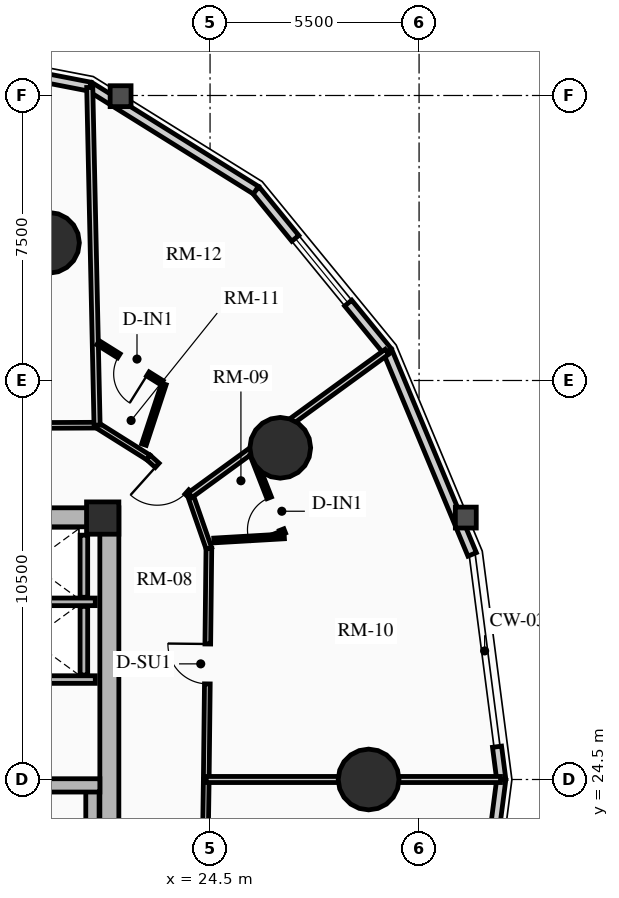
"""IFC4 building model, lengths in metres.
Left out: names, types, materials, properties, quantities, classifications, styles, units other than length and angle.
Written with IfcOpenShell. Run it as: python <this file> out.ifc"""

import sys

from ifc_helpers import new_model, si_unit, direction, frame, frame_2d, origin, origin_2d, place, context, subcontext, project, spatial, rectangle, circle, extrude, source, transform, mapped, element, fill, save


model = new_model("IFC4")
c1 = context("Model", 3, precision=1e-05, world=origin(), true_north=direction((0.0, 1.0)))
c2 = subcontext(c1, "Body", "Model", "MODEL_VIEW")
j1 = project(units=[si_unit("LENGTHUNIT", "METRE"), si_unit("PLANEANGLEUNIT", "RADIAN")], contexts=[c1])
p1 = place(None, origin())
s1 = spatial("IfcSite", under=j1, at=p1, CompositionType="ELEMENT")
p2 = place(p1, origin())
s2 = spatial("IfcBuilding", under=s1, at=p2, CompositionType="ELEMENT")
p3 = place(p2, frame((0.0, 0.0, 54.01)))
s3 = spatial("IfcBuildingStorey", under=s2, at=p3, CompositionType="ELEMENT", Elevation=54.01)
p4 = place(p3, frame((21.85, 17.35, 0.0), z_axis=(0.0, 0.0, 1.0), x_axis=(0.0, 1.0, 0.0)))
e1 = element("IfcWall", 1, at=p4, inside=s3, PredefinedType="SHEAR", context=c2, shape_type="SweptSolid", body=[
    extrude(rectangle(XDim=14.3, YDim=0.5, at=frame_2d((7.15, 0.0))), origin(), (0.0, 0.0, 1.0), 2.91),
])
p5 = place(p3, frame((11.15, 31.4, 0.0), z_axis=(0.0, 0.0, 1.0), x_axis=(1.0, 0.0, 0.0)))
e2 = element("IfcWall", 2, at=p5, inside=s3, PredefinedType="SHEAR", context=c2, shape_type="SweptSolid", body=[
    extrude(rectangle(XDim=10.7, YDim=0.5, at=frame_2d((5.35, 0.0))), origin(), (0.0, 0.0, 1.0), 2.91),
])
m1 = source(origin(), c2, "Body", "SweptSolid", [
    extrude(rectangle(XDim=1.5, YDim=2.02, at=frame_2d((0.75, 1.01))), frame((0.0, 0.26, 0.0), z_axis=(0.0, -1.0, 0.0), x_axis=(1.0, 0.0, 0.0)), (0.0, 0.0, 1.0), 0.52),
])
p6 = place(p5, frame((4.6, 0.0, 0.0)))
e3 = element("IfcOpeningElement", 3, at=p6, cuts=e2, PredefinedType="OPENING", context=c2, shape_type="MappedRepresentation", body=[
    mapped(m1, transform((0.0, 0.0, 0.0), x_axis=(1.0, 0.0, 0.0), y_axis=(0.0, 1.0, 0.0), z_axis=(0.0, 0.0, 1.0), scale=1.0)),
])
p7 = place(p3, frame((21.405, 17.6, 0.0), z_axis=(0.0, 0.0, 1.0), x_axis=(0.0, 1.0, 0.0)))
e4 = element("IfcWall", 4, at=p7, inside=s3, PredefinedType="SHEAR", context=c2, shape_type="SweptSolid", body=[
    extrude(rectangle(XDim=6.745, YDim=0.35, at=frame_2d((3.373, 0.0))), origin(), (0.0, 0.0, 1.0), 2.91),
])
p8 = place(p3, frame((18.315, 24.345, 0.0), z_axis=(0.0, 0.0, 1.0), x_axis=(1.0, 0.0, 0.0)))
e5 = element("IfcWall", 5, at=p8, inside=s3, PredefinedType="SHEAR", context=c2, shape_type="SweptSolid", body=[
    extrude(rectangle(XDim=3.285, YDim=0.35, at=frame_2d((1.643, 0.0))), origin(), (0.0, 0.0, 1.0), 2.91),
])
p9 = place(p3, frame((21.675, 31.38, 0.0), z_axis=(0.0, 0.0, 1.0), x_axis=(1.0, 0.0, 0.0)))
e6 = element("IfcColumn", 6, at=p9, inside=s3, PredefinedType="COLUMN", context=c2, shape_type="SweptSolid", body=[
    extrude(rectangle(XDim=0.85, YDim=0.85, at=origin_2d()), origin(), (0.0, 0.0, 1.0), 2.91),
])
for number, where, z_axis, x_axis in (
    (7, (28.672, 24.5, 0.0), (0.0, 0.0, 1.0), (1.0, 0.0, 0.0)),
    (8, (26.347, 33.229, 0.0), (0.0, 0.0, 1.0), (1.0, 0.0, 0.0)),
    (9, (20.261, 38.623, 0.0), (0.0, 0.0, 1.0), (1.0, 0.0, 0.0)),
):
    element("IfcColumn", number, at=place(p3, frame(where, z_axis=z_axis, x_axis=x_axis)), inside=s3, PredefinedType="USERDEFINED", context=c2, shape_type="SweptSolid", body=[
        extrude(circle(Radius=0.8, at=origin_2d()), origin(), (0.0, 0.0, 1.0), 2.91),
    ])
p10 = place(p3, frame((32.051, 25.363, 0.0), z_axis=(0.0, 0.0, 1.0), x_axis=(0.128523364007, -0.991706481225, 0.0)))
e10 = element("IfcWall", 10, at=p10, inside=s3, PredefinedType="SOLIDWALL", context=c2, shape_type="SweptSolid", body=[
    extrude(rectangle(XDim=0.87, YDim=0.24, at=frame_2d((0.435, 0.0))), origin(), (0.0, 0.0, 1.0), 2.635),
])
p11 = place(p3, frame((29.172, 35.768, 0.0), z_axis=(0.0, 0.0, 1.0), x_axis=(0.384348836956, -0.923187939442, 0.0)))
e11 = element("IfcWall", 11, at=p11, inside=s3, PredefinedType="SOLIDWALL", context=c2, shape_type="SweptSolid", body=[
    extrude(rectangle(XDim=5.789, YDim=0.24, at=frame_2d((2.894, 0.0))), origin(), (0.0, 0.0, 1.0), 2.073),
])
p12 = place(p3, frame((25.707, 40.009, 0.0), z_axis=(0.0, 0.0, 1.0), x_axis=(0.632713287022, -0.77438614168, 0.0)))
e12 = element("IfcWall", 12, at=p12, inside=s3, PredefinedType="SOLIDWALL", context=c2, shape_type="SweptSolid", body=[
    extrude(rectangle(XDim=5.477, YDim=0.24, at=frame_2d((2.738, 0.0))), origin(), (0.0, 0.0, 1.0), 2.073),
])
m2 = source(origin(), c2, "Body", "SweptSolid", [
    extrude(rectangle(XDim=2.2, YDim=1.35, at=frame_2d((1.1, 0.675))), frame((0.0, 0.13, 0.0), z_axis=(0.0, -1.0, 0.0), x_axis=(1.0, 0.0, 0.0)), (0.0, 0.0, 1.0), 0.26),
])
p13 = place(p12, frame((1.638, 0.0, 0.65)))
e13 = element("IfcOpeningElement", 13, at=p13, cuts=e12, PredefinedType="OPENING", context=c2, shape_type="MappedRepresentation", body=[
    mapped(m2, transform((0.0, 0.0, 0.0), x_axis=(1.0, 0.0, 0.0), y_axis=(0.0, 1.0, 0.0), z_axis=(0.0, 0.0, 1.0), scale=1.0)),
])
p14 = place(p3, frame((21.34, 42.732, 0.0), z_axis=(0.0, 0.0, 1.0), x_axis=(0.848533613342, -0.529141481107, 0.0)))
e14 = element("IfcWall", 14, at=p14, inside=s3, PredefinedType="SOLIDWALL", context=c2, shape_type="SweptSolid", body=[
    extrude(rectangle(XDim=5.146, YDim=0.24, at=frame_2d((2.573, 0.0))), origin(), (0.0, 0.0, 1.0), 2.073),
])
p15 = place(p3, frame((16.5, 43.67, 0.0), z_axis=(0.0, 0.0, 1.0), x_axis=(0.981725274071, -0.190303668512, 0.0)))
e15 = element("IfcWall", 15, at=p15, inside=s3, PredefinedType="SOLIDWALL", context=c2, shape_type="SweptSolid", body=[
    extrude(rectangle(XDim=4.93, YDim=0.24, at=frame_2d((2.465, 0.0))), origin(), (0.0, 0.0, 1.0), 2.073),
])
m3 = source(origin(), c2, "Body", "SweptSolid", [
    extrude(rectangle(XDim=1.9, YDim=1.35, at=frame_2d((0.95, 0.675))), frame((0.0, 0.13, 0.0), z_axis=(0.0, -1.0, 0.0), x_axis=(1.0, 0.0, 0.0)), (0.0, 0.0, 1.0), 0.26),
])
p16 = place(p15, frame((1.515, 0.0, 0.65)))
e16 = element("IfcOpeningElement", 16, at=p16, cuts=e15, PredefinedType="OPENING", context=c2, shape_type="MappedRepresentation", body=[
    mapped(m3, transform((0.0, 0.0, 0.0), x_axis=(1.0, 0.0, 0.0), y_axis=(0.0, 1.0, 0.0), z_axis=(0.0, 0.0, 1.0), scale=1.0)),
])
p17 = place(p3, frame((32.163, 24.5, 0.0), z_axis=(0.0, 0.0, 1.0), x_axis=(-0.128339641463, -0.991730274031, 0.0)))
e17 = element("IfcWall", 17, at=p17, inside=s3, PredefinedType="SOLIDWALL", context=c2, shape_type="SweptSolid", body=[
    extrude(rectangle(XDim=5.973, YDim=0.24, at=frame_2d((2.987, 0.0))), origin(), (0.0, 0.0, 1.0), 2.073),
])
p18 = place(p17, frame((2.037, 0.0, 0.65)))
e18 = element("IfcOpeningElement", 18, at=p18, cuts=e17, PredefinedType="OPENING", context=c2, shape_type="MappedRepresentation", body=[
    mapped(m3, transform((0.0, 0.0, 0.0), x_axis=(1.0, 0.0, 0.0), y_axis=(0.0, 1.0, 0.0), z_axis=(0.0, 0.0, 1.0), scale=1.0)),
])
for number, where, z_axis, x_axis in (
    (19, (18.51, 27.13, 0.0), (0.0, 0.0, 1.0), (1.0, 0.0, 0.0)),
    (20, (18.51, 29.175, 0.0), (0.0, 0.0, 1.0), (1.0, 0.0, 0.0)),
):
    element("IfcWall", number, at=place(p3, frame(where, z_axis=z_axis, x_axis=x_axis)), inside=s3, PredefinedType="SHEAR", context=c2, shape_type="SweptSolid", body=[
        extrude(rectangle(XDim=2.97, YDim=0.2, at=frame_2d((1.485, 0.0))), origin(), (0.0, 0.0, 1.0), 2.91),
    ])
p19 = place(p3, frame((21.18, 27.25, 0.0), z_axis=(0.0, 0.0, 1.0), x_axis=(0.0, 1.0, 0.0)))
e21 = element("IfcWall", 21, at=p19, inside=s3, PredefinedType="SHEAR", context=c2, shape_type="SweptSolid", body=[
    extrude(rectangle(XDim=1.805, YDim=0.2, at=frame_2d((0.902, 0.0))), origin(), (0.0, 0.0, 1.0), 2.91),
])
p20 = place(p3, frame((21.18, 29.295, 0.0), z_axis=(0.0, 0.0, 1.0), x_axis=(0.0, 1.0, 0.0)))
e22 = element("IfcWall", 22, at=p20, inside=s3, PredefinedType="SHEAR", context=c2, shape_type="SweptSolid", body=[
    extrude(rectangle(XDim=1.635, YDim=0.2, at=frame_2d((0.817, 0.0))), origin(), (0.0, 0.0, 1.0), 2.91),
])
p21 = place(p3, frame((24.4, 24.5, 0.0), z_axis=(0.0, 0.0, 1.0), x_axis=(0.011359710161, 0.999935476411, 0.0)))
e23 = element("IfcWall", 23, at=p21, inside=s3, PredefinedType="PARTITIONING", context=c2, shape_type="SweptSolid", body=[
    extrude(rectangle(XDim=6.082, YDim=0.15, at=frame_2d((3.041, 0.0))), origin(), (0.0, 0.0, 1.0), 2.159),
])
m4 = source(origin(), c2, "Body", "SweptSolid", [
    extrude(rectangle(XDim=1.05, YDim=2.015, at=frame_2d((0.525, 1.007))), frame((0.0, 0.085, 0.0), z_axis=(0.0, -1.0, 0.0), x_axis=(1.0, 0.0, 0.0)), (0.0, 0.0, 1.0), 0.17),
])
p22 = place(p21, frame((2.516, 0.0, 0.0)))
e24 = element("IfcOpeningElement", 24, at=p22, cuts=e23, PredefinedType="OPENING", context=c2, shape_type="MappedRepresentation", body=[
    mapped(m4, transform((0.0, 0.0, 0.0), x_axis=(1.0, 0.0, 0.0), y_axis=(0.0, 1.0, 0.0), z_axis=(0.0, 0.0, 1.0), scale=1.0)),
])
p23 = place(p3, frame((24.469, 30.582, 0.0), z_axis=(0.0, 0.0, 1.0), x_axis=(-0.328902536986, 0.944363871166, 0.0)))
e25 = element("IfcWall", 25, at=p23, inside=s3, PredefinedType="PARTITIONING", context=c2, shape_type="SweptSolid", body=[
    extrude(rectangle(XDim=1.488, YDim=0.15, at=frame_2d((0.744, 0.0))), origin(), (0.0, 0.0, 1.0), 2.205),
])
p24 = place(p3, frame((23.98, 31.987, 0.0), z_axis=(0.0, 0.0, 1.0), x_axis=(-0.744317922268, 0.667825449193, 0.0)))
e26 = element("IfcWall", 26, at=p24, inside=s3, PredefinedType="PARTITIONING", context=c2, shape_type="SweptSolid", body=[
    extrude(rectangle(XDim=1.481, YDim=0.15, at=frame_2d((0.74, 0.0))), origin(), (0.0, 0.0, 1.0), 2.159),
])
p25 = place(p24, frame((0.12, 0.0, 0.0)))
e27 = element("IfcOpeningElement", 27, at=p25, cuts=e26, PredefinedType="OPENING", context=c2, shape_type="MappedRepresentation", body=[
    mapped(m4, transform((0.0, 0.0, 0.0), x_axis=(1.0, 0.0, 0.0), y_axis=(0.0, 1.0, 0.0), z_axis=(0.0, 0.0, 1.0), scale=1.0)),
])
p26 = place(p3, frame((22.877, 32.976, 0.0), z_axis=(0.0, 0.0, 1.0), x_axis=(-0.846723232687, 0.532033614754, 0.0)))
e28 = element("IfcWall", 28, at=p26, inside=s3, PredefinedType="PARTITIONING", context=c2, shape_type="SweptSolid", body=[
    extrude(rectangle(XDim=1.595, YDim=0.15, at=frame_2d((0.797, 0.0))), origin(), (0.0, 0.0, 1.0), 2.205),
])
p27 = place(p3, frame((21.527, 33.824, 0.0), z_axis=(0.0, 0.0, 1.0), x_axis=(-0.999990631344, -0.00432865146, 0.0)))
e29 = element("IfcWall", 29, at=p27, inside=s3, PredefinedType="PARTITIONING", context=c2, shape_type="SweptSolid", body=[
    extrude(rectangle(XDim=3.384, YDim=0.15, at=frame_2d((1.692, 0.0))), origin(), (0.0, 0.0, 1.0), 2.159),
])
p28 = place(p27, frame((1.69, 0.0, 0.0)))
e30 = element("IfcOpeningElement", 30, at=p28, cuts=e29, PredefinedType="OPENING", context=c2, shape_type="MappedRepresentation", body=[
    mapped(m4, transform((0.0, 0.0, 0.0), x_axis=(1.0, 0.0, 0.0), y_axis=(0.0, 1.0, 0.0), z_axis=(0.0, 0.0, 1.0), scale=1.0)),
])
p29 = place(p3, frame((24.313, 18.529, 0.0), z_axis=(0.0, 0.0, 1.0), x_axis=(0.014472275982, 0.99989527113, 0.0)))
e31 = element("IfcWall", 31, at=p29, inside=s3, PredefinedType="PARTITIONING", context=c2, shape_type="SweptSolid", body=[
    extrude(rectangle(XDim=5.972, YDim=0.15, at=frame_2d((2.986, 0.0))), origin(), (0.0, 0.0, 1.0), 2.635),
])
m5 = source(origin(), c2, "Body", "SweptSolid", [
    extrude(rectangle(XDim=1.0, YDim=2.015, at=frame_2d((0.5, 1.007))), frame((0.0, 0.085, 0.0), z_axis=(0.0, -1.0, 0.0), x_axis=(1.0, 0.0, 0.0)), (0.0, 0.0, 1.0), 0.17),
])
p30 = place(p29, frame((2.486, 0.0, 0.0)))
e32 = element("IfcOpeningElement", 32, at=p30, cuts=e31, PredefinedType="OPENING", context=c2, shape_type="MappedRepresentation", body=[
    mapped(m5, transform((0.0, 0.0, 0.0), x_axis=(1.0, 0.0, 0.0), y_axis=(0.0, 1.0, 0.0), z_axis=(0.0, 0.0, 1.0), scale=1.0)),
])
p31 = place(p3, frame((24.4, 24.5, 0.0), z_axis=(0.0, 0.0, 1.0), x_axis=(1.0, 0.0, 0.0)))
e33 = element("IfcWall", 33, at=p31, inside=s3, PredefinedType="PARTITIONING", context=c2, shape_type="SweptSolid", body=[
    extrude(rectangle(XDim=7.743, YDim=0.16, at=frame_2d((3.872, 0.0))), origin(), (0.0, 0.0, 1.0), 2.073),
])
p32 = place(p3, frame((23.98, 31.987, 0.0), z_axis=(0.0, 0.0, 1.0), x_axis=(0.80834018144, 0.588715679313, 0.0)))
e34 = element("IfcWall", 34, at=p32, inside=s3, PredefinedType="PARTITIONING", context=c2, shape_type="SweptSolid", body=[
    extrude(rectangle(XDim=6.403, YDim=0.16, at=frame_2d((3.202, 0.0))), origin(), (0.0, 0.0, 1.0), 2.073),
])
p33 = place(p3, frame((21.527, 33.824, 0.0), z_axis=(0.0, 0.0, 1.0), x_axis=(-0.021694017061, 0.999764657119, 0.0)))
e35 = element("IfcWall", 35, at=p33, inside=s3, PredefinedType="PARTITIONING", context=c2, shape_type="SweptSolid", body=[
    extrude(rectangle(XDim=8.891, YDim=0.16, at=frame_2d((4.445, 0.0))), origin(), (0.0, 0.0, 1.0), 2.073),
])
p34 = place(p3, frame((24.601, 30.79, 0.0), z_axis=(0.0, 0.0, 1.0), x_axis=(0.998323904123, 0.057873849514, 0.0)))
e36 = element("IfcWall", 36, at=p34, inside=s3, PredefinedType="PARTITIONING", context=c2, shape_type="SweptSolid", body=[
    extrude(rectangle(XDim=1.856, YDim=0.125, at=frame_2d((0.928, 0.0))), origin(), (0.0, 0.0, 1.0), 2.205),
])
p35 = place(p3, frame((26.428, 30.963, 0.0), z_axis=(0.0, 0.0, 1.0), x_axis=(-0.364149471566, 0.931340519014, 0.0)))
e37 = element("IfcWall", 37, at=p35, inside=s3, PredefinedType="PARTITIONING", context=c2, shape_type="SweptSolid", body=[
    extrude(rectangle(XDim=2.247, YDim=0.125, at=frame_2d((1.124, 0.0))), origin(), (0.0, 0.0, 1.0), 2.159),
])
m6 = source(origin(), c2, "Body", "SweptSolid", [
    extrude(rectangle(XDim=0.9, YDim=2.005, at=frame_2d((0.45, 1.002))), frame((0.0, 0.073, 0.0), z_axis=(0.0, -1.0, 0.0), x_axis=(1.0, 0.0, 0.0)), (0.0, 0.0, 1.0), 0.145),
])
p36 = place(p35, frame((0.12, 0.0, 0.0)))
e38 = element("IfcOpeningElement", 38, at=p36, cuts=e37, PredefinedType="OPENING", context=c2, shape_type="MappedRepresentation", body=[
    mapped(m6, transform((0.0, 0.0, 0.0), x_axis=(1.0, 0.0, 0.0), y_axis=(0.0, 1.0, 0.0), z_axis=(0.0, 0.0, 1.0), scale=1.0)),
])
p37 = place(p3, frame((22.76, 33.313, 0.0), z_axis=(0.0, 0.0, 1.0), x_axis=(0.312649886595, 0.949868437423, 0.0)))
e39 = element("IfcWall", 39, at=p37, inside=s3, PredefinedType="PARTITIONING", context=c2, shape_type="SweptSolid", body=[
    extrude(rectangle(XDim=1.68, YDim=0.125, at=frame_2d((0.84, 0.0))), origin(), (0.0, 0.0, 1.0), 2.205),
])
p38 = place(p3, frame((23.233, 34.941, 0.0), z_axis=(0.0, 0.0, 1.0), x_axis=(-0.84760373009, 0.53062973601, 0.0)))
e40 = element("IfcWall", 40, at=p38, inside=s3, PredefinedType="PARTITIONING", context=c2, shape_type="SweptSolid", body=[
    extrude(rectangle(XDim=1.983, YDim=0.125, at=frame_2d((0.991, 0.0))), origin(), (0.0, 0.0, 1.0), 2.635),
])
p39 = place(p38, frame((0.436, 0.0, 0.0)))
e41 = element("IfcOpeningElement", 41, at=p39, cuts=e40, PredefinedType="OPENING", context=c2, shape_type="MappedRepresentation", body=[
    mapped(m6, transform((0.0, 0.0, 0.0), x_axis=(1.0, 0.0, 0.0), y_axis=(0.0, 1.0, 0.0), z_axis=(0.0, 0.0, 1.0), scale=1.0)),
])
m7 = source(origin(), c2, "Body", "SweptSolid", [
    extrude(rectangle(XDim=2.2, YDim=1.35, at=frame_2d((1.1, 0.675))), frame((0.0, 0.03, 0.0), z_axis=(0.0, -1.0, 0.0), x_axis=(1.0, 0.0, 0.0)), (0.0, 0.0, 1.0), 0.06),
])
p40 = place(p13, origin())
e42 = element("IfcWindow", 42, at=p40, inside=s3, PartitioningType="DOUBLE_PANEL_VERTICAL", PredefinedType="WINDOW", context=c2, shape_type="MappedRepresentation", body=[
    mapped(m7, transform((0.0, 0.0, 0.0), x_axis=(1.0, 0.0, 0.0), y_axis=(0.0, 1.0, 0.0), z_axis=(0.0, 0.0, 1.0), scale=1.0)),
])
fill(e13, e42)
m8 = source(origin(), c2, "Body", "SweptSolid", [
    extrude(rectangle(XDim=1.05, YDim=2.015, at=frame_2d((0.525, 1.007))), frame((0.0, 0.025, 0.0), z_axis=(0.0, -1.0, 0.0), x_axis=(1.0, 0.0, 0.0)), (0.0, 0.0, 1.0), 0.05),
])
p41 = place(p22, origin())
e43 = element("IfcDoor", 43, at=p41, inside=s3, OperationType="SINGLE_SWING_RIGHT", PredefinedType="DOOR", context=c2, shape_type="MappedRepresentation", body=[
    mapped(m8, transform((0.0, 0.0, 0.0), x_axis=(1.0, 0.0, 0.0), y_axis=(0.0, 1.0, 0.0), z_axis=(0.0, 0.0, 1.0), scale=1.0)),
])
fill(e24, e43)
m9 = source(origin(), c2, "Body", "SweptSolid", [
    extrude(rectangle(XDim=0.9, YDim=2.005, at=frame_2d((0.45, 1.002))), frame((0.0, 0.025, 0.0), z_axis=(0.0, -1.0, 0.0), x_axis=(1.0, 0.0, 0.0)), (0.0, 0.0, 1.0), 0.05),
])
p42 = place(p36, origin())
e44 = element("IfcDoor", 44, at=p42, inside=s3, OperationType="SINGLE_SWING_LEFT", PredefinedType="DOOR", context=c2, shape_type="MappedRepresentation", body=[
    mapped(m9, transform((0.0, 0.0, 0.0), x_axis=(1.0, 0.0, 0.0), y_axis=(0.0, 1.0, 0.0), z_axis=(0.0, 0.0, 1.0), scale=1.0)),
])
fill(e38, e44)
p43 = place(p25, origin())
e45 = element("IfcDoor", 45, at=p43, inside=s3, OperationType="SINGLE_SWING_RIGHT", PredefinedType="DOOR", context=c2, shape_type="MappedRepresentation", body=[
    mapped(m8, transform((0.0, 0.0, 0.0), x_axis=(1.0, 0.0, 0.0), y_axis=(0.0, 1.0, 0.0), z_axis=(0.0, 0.0, 1.0), scale=1.0)),
])
fill(e27, e45)
p44 = place(p39, origin())
e46 = element("IfcDoor", 46, at=p44, inside=s3, OperationType="SINGLE_SWING_LEFT", PredefinedType="DOOR", context=c2, shape_type="MappedRepresentation", body=[
    mapped(m9, transform((0.0, 0.0, 0.0), x_axis=(1.0, 0.0, 0.0), y_axis=(0.0, 1.0, 0.0), z_axis=(0.0, 0.0, 1.0), scale=1.0)),
])
fill(e41, e46)
save(model, sys.argv[1])
